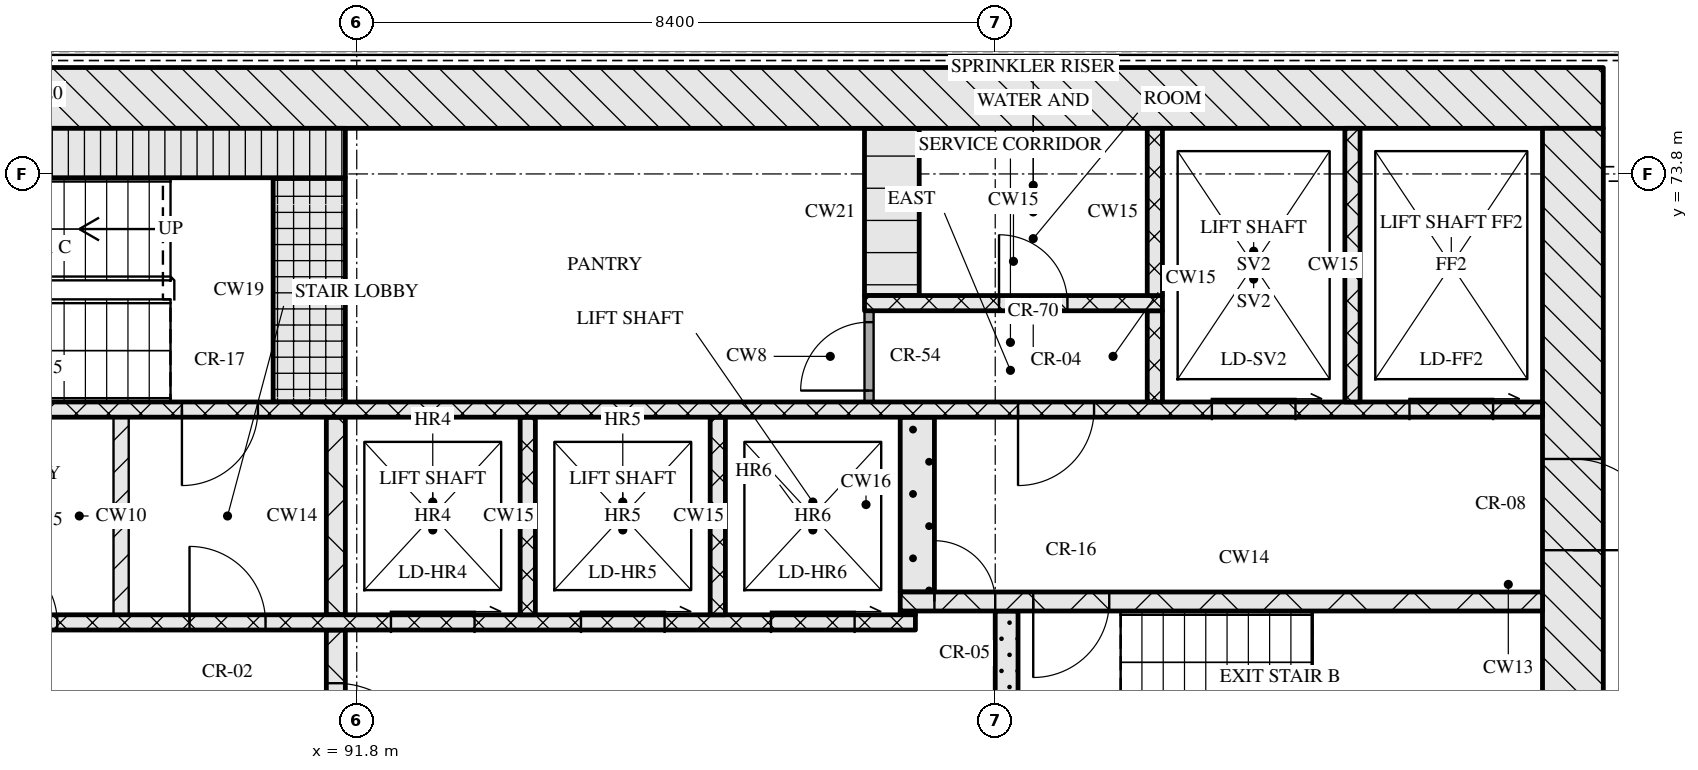
"""IFC4 building model, lengths in metres.
Left out: names, types, materials, properties, quantities, classifications, styles, units other than length and angle.
Written with IfcOpenShell. Run it as: python <this file> out.ifc"""

import sys

from ifc_helpers import new_model, si_unit, direction, frame, frame_2d, origin, place, context, subcontext, project, spatial, rectangle, extrude, element, fill, save


model = new_model("IFC4")
c1 = context("Model", 3, precision=1e-05, world=origin(), true_north=direction((0.0, 1.0)))
c2 = subcontext(c1, "Body", "Model", "MODEL_VIEW")
j1 = project(units=[si_unit("LENGTHUNIT", "METRE"), si_unit("PLANEANGLEUNIT", "RADIAN")], contexts=[c1])
p1 = place(None, origin())
s1 = spatial("IfcSite", under=j1, at=p1, CompositionType="ELEMENT")
p2 = place(p1, origin())
s2 = spatial("IfcBuilding", under=s1, at=p2, CompositionType="ELEMENT")
p3 = place(p2, frame((0.0, 0.0, 183.45)))
s3 = spatial("IfcBuildingStorey", under=s2, at=p3, CompositionType="ELEMENT", Elevation=183.45)
p4 = place(p3, frame((67.0, 74.8, 0.0), z_axis=(0.0, 0.0, 1.0), x_axis=(1.0, 0.0, 0.0)))
e1 = element("IfcWall", 1, at=p4, inside=s3, PredefinedType="SOLIDWALL", context=c2, shape_type="SweptSolid", body=[
    extrude(rectangle(XDim=41.2, YDim=0.8, at=frame_2d((20.6, 0.0))), origin(), (0.0, 0.0, 1.0), 3.32),
])
p5 = place(p3, frame((107.8, 62.4, 0.0), z_axis=(0.0, 0.0, 1.0), x_axis=(0.0, 1.0, 0.0)))
e2 = element("IfcWall", 2, at=p5, inside=s3, PredefinedType="SOLIDWALL", context=c2, shape_type="SweptSolid", body=[
    extrude(rectangle(XDim=12.0, YDim=0.8, at=frame_2d((6.0, 0.0))), origin(), (0.0, 0.0, 1.0), 3.32),
])
p6 = place(p5, frame((6.45, 0.0, 0.0)))
e3 = element("IfcOpeningElement", 3, at=p6, cuts=e2, PredefinedType="OPENING", context=c2, shape_type="SweptSolid", body=[
    extrude(rectangle(XDim=1.2, YDim=2.1, at=frame_2d((0.6, 1.05))), frame((0.0, 0.41, 0.0), z_axis=(0.0, -1.0, 0.0), x_axis=(1.0, 0.0, 0.0)), (0.0, 0.0, 1.0), 0.82),
])
p7 = place(p3, frame((91.525, 65.2, 0.0), z_axis=(0.0, 0.0, 1.0), x_axis=(0.0, 1.0, 0.0)))
e4 = element("IfcWall", 4, at=p7, inside=s3, PredefinedType="SOLIDWALL", context=c2, shape_type="SweptSolid", body=[
    extrude(rectangle(XDim=2.6, YDim=0.25, at=frame_2d((1.3, 0.0))), origin(), (0.0, 0.0, 1.0), 3.32),
])
p8 = place(p7, frame((0.7, 0.0, 0.0)))
e5 = element("IfcOpeningElement", 5, at=p8, cuts=e4, PredefinedType="OPENING", context=c2, shape_type="SweptSolid", body=[
    extrude(rectangle(XDim=1.2, YDim=2.1, at=frame_2d((0.6, 1.05))), frame((0.0, 0.135, 0.0), z_axis=(0.0, -1.0, 0.0), x_axis=(1.0, 0.0, 0.0)), (0.0, 0.0, 1.0), 0.27),
])
p9 = place(p3, frame((100.35, 65.2, 0.0), z_axis=(0.0, 0.0, 1.0), x_axis=(0.0, 1.0, 0.0)))
e6 = element("IfcWall", 6, at=p9, inside=s3, PredefinedType="SOLIDWALL", context=c2, shape_type="SweptSolid", body=[
    extrude(rectangle(XDim=2.85, YDim=0.3, at=frame_2d((1.425, 0.0))), origin(), (0.0, 0.0, 1.0), 3.32),
])
p10 = place(p3, frame((76.05, 67.9, 0.0), z_axis=(0.0, 0.0, 1.0), x_axis=(1.0, 0.0, 0.0)))
e7 = element("IfcWall", 7, at=p10, inside=s3, PredefinedType="SOLIDWALL", context=c2, shape_type="SweptSolid", body=[
    extrude(rectangle(XDim=23.1, YDim=0.2, at=frame_2d((11.55, 0.0))), origin(), (0.0, 0.0, 1.0), 3.32),
])
p11 = place(p10, frame((0.75, 0.0, 0.0)))
e8 = element("IfcOpeningElement", 8, at=p11, cuts=e7, PredefinedType="OPENING", context=c2, shape_type="SweptSolid", body=[
    extrude(rectangle(XDim=0.9, YDim=2.1, at=frame_2d((0.45, 1.05))), frame((0.0, 0.11, 0.0), z_axis=(0.0, -1.0, 0.0), x_axis=(1.0, 0.0, 0.0)), (0.0, 0.0, 1.0), 0.22),
])
p12 = place(p10, frame((3.32, 0.0, 0.0)))
e9 = element("IfcOpeningElement", 9, at=p12, cuts=e7, PredefinedType="OPENING", context=c2, shape_type="SweptSolid", body=[
    extrude(rectangle(XDim=0.9, YDim=2.1, at=frame_2d((0.45, 1.05))), frame((0.0, 0.11, 0.0), z_axis=(0.0, -1.0, 0.0), x_axis=(1.0, 0.0, 0.0)), (0.0, 0.0, 1.0), 0.22),
])
p13 = place(p10, frame((5.77, 0.0, 0.0)))
e10 = element("IfcOpeningElement", 10, at=p13, cuts=e7, PredefinedType="OPENING", context=c2, shape_type="SweptSolid", body=[
    extrude(rectangle(XDim=0.9, YDim=2.1, at=frame_2d((0.45, 1.05))), frame((0.0, 0.11, 0.0), z_axis=(0.0, -1.0, 0.0), x_axis=(1.0, 0.0, 0.0)), (0.0, 0.0, 1.0), 0.22),
])
p14 = place(p10, frame((8.45, 0.0, 0.0)))
e11 = element("IfcOpeningElement", 11, at=p14, cuts=e7, PredefinedType="OPENING", context=c2, shape_type="SweptSolid", body=[
    extrude(rectangle(XDim=0.9, YDim=2.1, at=frame_2d((0.45, 1.05))), frame((0.0, 0.11, 0.0), z_axis=(0.0, -1.0, 0.0), x_axis=(1.0, 0.0, 0.0)), (0.0, 0.0, 1.0), 0.22),
])
p15 = place(p10, frame((10.91, 0.0, 0.0)))
e12 = element("IfcOpeningElement", 12, at=p15, cuts=e7, PredefinedType="OPENING", context=c2, shape_type="SweptSolid", body=[
    extrude(rectangle(XDim=0.9, YDim=2.1, at=frame_2d((0.45, 1.05))), frame((0.0, 0.11, 0.0), z_axis=(0.0, -1.0, 0.0), x_axis=(1.0, 0.0, 0.0)), (0.0, 0.0, 1.0), 0.22),
])
p16 = place(p10, frame((13.55, 0.0, 0.0)))
e13 = element("IfcOpeningElement", 13, at=p16, cuts=e7, PredefinedType="OPENING", context=c2, shape_type="SweptSolid", body=[
    extrude(rectangle(XDim=1.0, YDim=2.1, at=frame_2d((0.5, 1.05))), frame((0.0, 0.11, 0.0), z_axis=(0.0, -1.0, 0.0), x_axis=(1.0, 0.0, 0.0)), (0.0, 0.0, 1.0), 0.22),
])
p17 = place(p10, frame((16.2, 0.0, 0.0)))
e14 = element("IfcOpeningElement", 14, at=p17, cuts=e7, PredefinedType="OPENING", context=c2, shape_type="SweptSolid", body=[
    extrude(rectangle(XDim=1.1, YDim=2.1, at=frame_2d((0.55, 1.05))), frame((0.0, 0.11, 0.0), z_axis=(0.0, -1.0, 0.0), x_axis=(1.0, 0.0, 0.0)), (0.0, 0.0, 1.0), 0.22),
])
p18 = place(p10, frame((18.7, 0.0, 0.0)))
e15 = element("IfcOpeningElement", 15, at=p18, cuts=e7, PredefinedType="OPENING", context=c2, shape_type="SweptSolid", body=[
    extrude(rectangle(XDim=1.1, YDim=2.1, at=frame_2d((0.55, 1.05))), frame((0.0, 0.11, 0.0), z_axis=(0.0, -1.0, 0.0), x_axis=(1.0, 0.0, 0.0)), (0.0, 0.0, 1.0), 0.22),
])
p19 = place(p10, frame((21.2, 0.0, 0.0)))
e16 = element("IfcOpeningElement", 16, at=p19, cuts=e7, PredefinedType="OPENING", context=c2, shape_type="SweptSolid", body=[
    extrude(rectangle(XDim=1.1, YDim=2.1, at=frame_2d((0.55, 1.05))), frame((0.0, 0.11, 0.0), z_axis=(0.0, -1.0, 0.0), x_axis=(1.0, 0.0, 0.0)), (0.0, 0.0, 1.0), 0.22),
])
p20 = place(p3, frame((88.7, 68.0, 0.0), z_axis=(0.0, 0.0, 1.0), x_axis=(0.0, 1.0, 0.0)))
e17 = element("IfcWall", 17, at=p20, inside=s3, PredefinedType="PARTITIONING", context=c2, shape_type="SweptSolid", body=[
    extrude(rectangle(XDim=2.6, YDim=0.2, at=frame_2d((1.3, 0.0))), origin(), (0.0, 0.0, 1.0), 3.32),
])
p21 = place(p3, frame((91.525, 68.0, 0.0), z_axis=(0.0, 0.0, 1.0), x_axis=(0.0, 1.0, 0.0)))
e18 = element("IfcWall", 18, at=p21, inside=s3, PredefinedType="SOLIDWALL", context=c2, shape_type="SweptSolid", body=[
    extrude(rectangle(XDim=2.6, YDim=0.25, at=frame_2d((1.3, 0.0))), origin(), (0.0, 0.0, 1.0), 3.32),
])
for number, where, z_axis, x_axis in (
    (19, (94.05, 68.0, 0.0), (0.0, 0.0, 1.0), (0.0, 1.0, 0.0)),
    (20, (96.55, 68.0, 0.0), (0.0, 0.0, 1.0), (0.0, 1.0, 0.0)),
):
    element("IfcWall", number, at=place(p3, frame(where, z_axis=z_axis, x_axis=x_axis)), inside=s3, PredefinedType="SOLIDWALL", context=c2, shape_type="SweptSolid", body=[
        extrude(rectangle(XDim=2.6, YDim=0.2, at=frame_2d((1.3, 0.0))), origin(), (0.0, 0.0, 1.0), 3.32),
    ])
p22 = place(p3, frame((98.95, 68.025, 0.0), z_axis=(0.0, 0.0, 1.0), x_axis=(1.0, 0.0, 0.0)))
e21 = element("IfcWall", 21, at=p22, inside=s3, PredefinedType="SOLIDWALL", context=c2, shape_type="SweptSolid", body=[
    extrude(rectangle(XDim=0.2, YDim=0.05, at=frame_2d((0.1, 0.0))), origin(), (0.0, 0.0, 1.0), 3.32),
])
p23 = place(p3, frame((98.95, 68.175, 0.0), z_axis=(0.0, 0.0, 1.0), x_axis=(1.0, 0.0, 0.0)))
e22 = element("IfcWall", 22, at=p23, inside=s3, PredefinedType="SOLIDWALL", context=c2, shape_type="SweptSolid", body=[
    extrude(rectangle(XDim=8.45, YDim=0.25, at=frame_2d((4.225, 0.0))), origin(), (0.0, 0.0, 1.0), 3.32),
])
p24 = place(p23, frame((0.45, 0.0, 0.0)))
e23 = element("IfcOpeningElement", 23, at=p24, cuts=e22, PredefinedType="OPENING", context=c2, shape_type="SweptSolid", body=[
    extrude(rectangle(XDim=0.8, YDim=2.1, at=frame_2d((0.4, 1.05))), frame((0.0, 0.135, 0.0), z_axis=(0.0, -1.0, 0.0), x_axis=(1.0, 0.0, 0.0)), (0.0, 0.0, 1.0), 0.27),
])
p25 = place(p23, frame((1.75, 0.0, 0.0)))
e24 = element("IfcOpeningElement", 24, at=p25, cuts=e22, PredefinedType="OPENING", context=c2, shape_type="SweptSolid", body=[
    extrude(rectangle(XDim=1.0, YDim=2.1, at=frame_2d((0.5, 1.05))), frame((0.0, 0.135, 0.0), z_axis=(0.0, -1.0, 0.0), x_axis=(1.0, 0.0, 0.0)), (0.0, 0.0, 1.0), 0.27),
])
p26 = place(p3, frame((99.175, 68.3, 0.0), z_axis=(0.0, 0.0, 1.0), x_axis=(0.0, 1.0, 0.0)))
e25 = element("IfcWall", 25, at=p26, inside=s3, PredefinedType="SOLIDWALL", context=c2, shape_type="SweptSolid", body=[
    extrude(rectangle(XDim=2.3, YDim=0.45, at=frame_2d((1.15, 0.0))), origin(), (0.0, 0.0, 1.0), 3.32),
])
p27 = place(p3, frame((67.8, 70.7, 0.0), z_axis=(0.0, 0.0, 1.0), x_axis=(1.0, 0.0, 0.0)))
e26 = element("IfcWall", 26, at=p27, inside=s3, PredefinedType="SOLIDWALL", context=c2, shape_type="SweptSolid", body=[
    extrude(rectangle(XDim=39.6, YDim=0.2, at=frame_2d((19.8, 0.0))), origin(), (0.0, 0.0, 1.0), 3.32),
])
p28 = place(p27, frame((0.65, 0.0, 0.0)))
e27 = element("IfcOpeningElement", 27, at=p28, cuts=e26, PredefinedType="OPENING", context=c2, shape_type="SweptSolid", body=[
    extrude(rectangle(XDim=1.1, YDim=2.1, at=frame_2d((0.55, 1.05))), frame((0.0, 0.11, 0.0), z_axis=(0.0, -1.0, 0.0), x_axis=(1.0, 0.0, 0.0)), (0.0, 0.0, 1.0), 0.22),
])
p29 = place(p27, frame((3.25, 0.0, 0.0)))
e28 = element("IfcOpeningElement", 28, at=p29, cuts=e26, PredefinedType="OPENING", context=c2, shape_type="SweptSolid", body=[
    extrude(rectangle(XDim=1.1, YDim=2.1, at=frame_2d((0.55, 1.05))), frame((0.0, 0.11, 0.0), z_axis=(0.0, -1.0, 0.0), x_axis=(1.0, 0.0, 0.0)), (0.0, 0.0, 1.0), 0.22),
])
p30 = place(p27, frame((5.9, 0.0, 0.0)))
e29 = element("IfcOpeningElement", 29, at=p30, cuts=e26, PredefinedType="OPENING", context=c2, shape_type="SweptSolid", body=[
    extrude(rectangle(XDim=1.0, YDim=2.1, at=frame_2d((0.5, 1.05))), frame((0.0, 0.11, 0.0), z_axis=(0.0, -1.0, 0.0), x_axis=(1.0, 0.0, 0.0)), (0.0, 0.0, 1.0), 0.22),
])
p31 = place(p27, frame((21.7, 0.0, 0.0)))
e30 = element("IfcOpeningElement", 30, at=p31, cuts=e26, PredefinedType="OPENING", context=c2, shape_type="SweptSolid", body=[
    extrude(rectangle(XDim=1.0, YDim=2.1, at=frame_2d((0.5, 1.05))), frame((0.0, 0.11, 0.0), z_axis=(0.0, -1.0, 0.0), x_axis=(1.0, 0.0, 0.0)), (0.0, 0.0, 1.0), 0.22),
])
p32 = place(p27, frame((32.7, 0.0, 0.0)))
e31 = element("IfcOpeningElement", 31, at=p32, cuts=e26, PredefinedType="OPENING", context=c2, shape_type="SweptSolid", body=[
    extrude(rectangle(XDim=1.0, YDim=2.1, at=frame_2d((0.5, 1.05))), frame((0.0, 0.11, 0.0), z_axis=(0.0, -1.0, 0.0), x_axis=(1.0, 0.0, 0.0)), (0.0, 0.0, 1.0), 0.22),
])
p33 = place(p27, frame((35.25, 0.0, 0.0)))
e32 = element("IfcOpeningElement", 32, at=p33, cuts=e26, PredefinedType="OPENING", context=c2, shape_type="SweptSolid", body=[
    extrude(rectangle(XDim=1.1, YDim=2.1, at=frame_2d((0.55, 1.05))), frame((0.0, 0.11, 0.0), z_axis=(0.0, -1.0, 0.0), x_axis=(1.0, 0.0, 0.0)), (0.0, 0.0, 1.0), 0.22),
])
p34 = place(p27, frame((37.85, 0.0, 0.0)))
e33 = element("IfcOpeningElement", 33, at=p34, cuts=e26, PredefinedType="OPENING", context=c2, shape_type="SweptSolid", body=[
    extrude(rectangle(XDim=1.1, YDim=2.1, at=frame_2d((0.55, 1.05))), frame((0.0, 0.11, 0.0), z_axis=(0.0, -1.0, 0.0), x_axis=(1.0, 0.0, 0.0)), (0.0, 0.0, 1.0), 0.22),
])
p35 = place(p3, frame((91.175, 70.8, 0.0), z_axis=(0.0, 0.0, 1.0), x_axis=(0.0, 1.0, 0.0)))
e34 = element("IfcWall", 34, at=p35, inside=s3, PredefinedType="SOLIDWALL", context=c2, shape_type="SweptSolid", body=[
    extrude(rectangle(XDim=2.95, YDim=0.95, at=frame_2d((1.475, 0.0))), origin(), (0.0, 0.0, 1.0), 3.32),
])
p36 = place(p3, frame((98.54, 70.8, 0.0), z_axis=(0.0, 0.0, 1.0), x_axis=(0.0, 1.0, 0.0)))
e35 = element("IfcWall", 35, at=p36, inside=s3, PredefinedType="PARTITIONING", context=c2, shape_type="SweptSolid", body=[
    extrude(rectangle(XDim=1.2, YDim=0.12, at=frame_2d((0.6, 0.0))), origin(), (0.0, 0.0, 1.0), 3.32),
])
p37 = place(p36, frame((0.15, 0.0, 0.0)))
e36 = element("IfcOpeningElement", 36, at=p37, cuts=e35, PredefinedType="OPENING", context=c2, shape_type="SweptSolid", body=[
    extrude(rectangle(XDim=0.9, YDim=2.1, at=frame_2d((0.45, 1.05))), frame((0.0, 0.07, 0.0), z_axis=(0.0, -1.0, 0.0), x_axis=(1.0, 0.0, 0.0)), (0.0, 0.0, 1.0), 0.14),
])
p38 = place(p3, frame((102.3, 70.8, 0.0), z_axis=(0.0, 0.0, 1.0), x_axis=(0.0, 1.0, 0.0)))
e37 = element("IfcWall", 37, at=p38, inside=s3, PredefinedType="SOLIDWALL", context=c2, shape_type="SweptSolid", body=[
    extrude(rectangle(XDim=1.2, YDim=0.2, at=frame_2d((0.6, 0.0))), origin(), (0.0, 0.0, 1.0), 3.32),
])
p39 = place(p3, frame((104.9, 70.8, 0.0), z_axis=(0.0, 0.0, 1.0), x_axis=(0.0, 1.0, 0.0)))
e38 = element("IfcWall", 38, at=p39, inside=s3, PredefinedType="SOLIDWALL", context=c2, shape_type="SweptSolid", body=[
    extrude(rectangle(XDim=3.6, YDim=0.2, at=frame_2d((1.8, 0.0))), origin(), (0.0, 0.0, 1.0), 3.32),
])
p40 = place(p3, frame((98.48, 72.1, 0.0), z_axis=(0.0, 0.0, 1.0), x_axis=(1.0, 0.0, 0.0)))
e39 = element("IfcWall", 39, at=p40, inside=s3, PredefinedType="SOLIDWALL", context=c2, shape_type="SweptSolid", body=[
    extrude(rectangle(XDim=3.92, YDim=0.2, at=frame_2d((1.96, 0.0))), origin(), (0.0, 0.0, 1.0), 3.32),
])
p41 = place(p40, frame((1.77, 0.0, 0.0)))
e40 = element("IfcOpeningElement", 40, at=p41, cuts=e39, PredefinedType="OPENING", context=c2, shape_type="SweptSolid", body=[
    extrude(rectangle(XDim=0.9, YDim=2.1, at=frame_2d((0.45, 1.05))), frame((0.0, 0.11, 0.0), z_axis=(0.0, -1.0, 0.0), x_axis=(1.0, 0.0, 0.0)), (0.0, 0.0, 1.0), 0.22),
])
p42 = place(p3, frame((98.84, 72.2, 0.0), z_axis=(0.0, 0.0, 1.0), x_axis=(0.0, 1.0, 0.0)))
e41 = element("IfcWall", 41, at=p42, inside=s3, PredefinedType="SOLIDWALL", context=c2, shape_type="SweptSolid", body=[
    extrude(rectangle(XDim=2.2, YDim=0.72, at=frame_2d((1.1, 0.0))), origin(), (0.0, 0.0, 1.0), 3.32),
])
p43 = place(p3, frame((102.3, 72.2, 0.0), z_axis=(0.0, 0.0, 1.0), x_axis=(0.0, 1.0, 0.0)))
e42 = element("IfcWall", 42, at=p43, inside=s3, PredefinedType="SOLIDWALL", context=c2, shape_type="SweptSolid", body=[
    extrude(rectangle(XDim=2.2, YDim=0.2, at=frame_2d((1.1, 0.0))), origin(), (0.0, 0.0, 1.0), 3.32),
])
p44 = place(p3, frame((83.55, 74.075, 0.0), z_axis=(0.0, 0.0, 1.0), x_axis=(1.0, 0.0, 0.0)))
e43 = element("IfcWall", 43, at=p44, inside=s3, PredefinedType="SOLIDWALL", context=c2, shape_type="SweptSolid", body=[
    extrude(rectangle(XDim=8.1, YDim=0.65, at=frame_2d((4.05, 0.0))), origin(), (0.0, 0.0, 1.0), 3.32),
])
p45 = place(p8, origin())
e44 = element("IfcDoor", 44, at=p45, inside=s3, OperationType="SINGLE_SWING_RIGHT", PredefinedType="DOOR", context=c2, shape_type="SweptSolid", body=[
    extrude(rectangle(XDim=1.2, YDim=2.1, at=frame_2d((0.6, 1.05))), frame((0.0, 0.025, 0.0), z_axis=(0.0, -1.0, 0.0), x_axis=(1.0, 0.0, 0.0)), (0.0, 0.0, 1.0), 0.05),
])
fill(e5, e44)
p46 = place(p15, origin())
e45 = element("IfcDoor", 45, at=p46, inside=s3, OperationType="SINGLE_SWING_LEFT", PredefinedType="DOOR", context=c2, shape_type="SweptSolid", body=[
    extrude(rectangle(XDim=0.9, YDim=2.1, at=frame_2d((0.45, 1.05))), frame((0.0, 0.025, 0.0), z_axis=(0.0, -1.0, 0.0), x_axis=(1.0, 0.0, 0.0)), (0.0, 0.0, 1.0), 0.05),
])
fill(e12, e45)
p47 = place(p16, origin())
e46 = element("IfcDoor", 46, at=p47, inside=s3, OperationType="SINGLE_SWING_LEFT", PredefinedType="DOOR", context=c2, shape_type="SweptSolid", body=[
    extrude(rectangle(XDim=1.0, YDim=2.1, at=frame_2d((0.5, 1.05))), frame((0.0, 0.025, 0.0), z_axis=(0.0, -1.0, 0.0), x_axis=(1.0, 0.0, 0.0)), (0.0, 0.0, 1.0), 0.05),
])
fill(e13, e46)
p48 = place(p17, origin())
e47 = element("IfcDoor", 47, at=p48, inside=s3, OperationType="SLIDING_TO_RIGHT", PredefinedType="DOOR", context=c2, shape_type="SweptSolid", body=[
    extrude(rectangle(XDim=1.1, YDim=2.1, at=frame_2d((0.55, 1.05))), frame((0.0, 0.025, 0.0), z_axis=(0.0, -1.0, 0.0), x_axis=(1.0, 0.0, 0.0)), (0.0, 0.0, 1.0), 0.05),
])
fill(e14, e47)
p49 = place(p18, origin())
e48 = element("IfcDoor", 48, at=p49, inside=s3, OperationType="SLIDING_TO_RIGHT", PredefinedType="DOOR", context=c2, shape_type="SweptSolid", body=[
    extrude(rectangle(XDim=1.1, YDim=2.1, at=frame_2d((0.55, 1.05))), frame((0.0, 0.025, 0.0), z_axis=(0.0, -1.0, 0.0), x_axis=(1.0, 0.0, 0.0)), (0.0, 0.0, 1.0), 0.05),
])
fill(e15, e48)
p50 = place(p19, origin())
e49 = element("IfcDoor", 49, at=p50, inside=s3, OperationType="SLIDING_TO_RIGHT", PredefinedType="DOOR", context=c2, shape_type="SweptSolid", body=[
    extrude(rectangle(XDim=1.1, YDim=2.1, at=frame_2d((0.55, 1.05))), frame((0.0, 0.025, 0.0), z_axis=(0.0, -1.0, 0.0), x_axis=(1.0, 0.0, 0.0)), (0.0, 0.0, 1.0), 0.05),
])
fill(e16, e49)
p51 = place(p24, origin())
e50 = element("IfcDoor", 50, at=p51, inside=s3, OperationType="SINGLE_SWING_LEFT", PredefinedType="DOOR", context=c2, shape_type="SweptSolid", body=[
    extrude(rectangle(XDim=0.8, YDim=2.1, at=frame_2d((0.4, 1.05))), frame((0.0, 0.025, 0.0), z_axis=(0.0, -1.0, 0.0), x_axis=(1.0, 0.0, 0.0)), (0.0, 0.0, 1.0), 0.05),
])
fill(e23, e50)
p52 = place(p25, origin())
e51 = element("IfcDoor", 51, at=p52, inside=s3, OperationType="SINGLE_SWING_RIGHT", PredefinedType="DOOR", context=c2, shape_type="SweptSolid", body=[
    extrude(rectangle(XDim=1.0, YDim=2.1, at=frame_2d((0.5, 1.05))), frame((0.0, 0.025, 0.0), z_axis=(0.0, -1.0, 0.0), x_axis=(1.0, 0.0, 0.0)), (0.0, 0.0, 1.0), 0.05),
])
fill(e24, e51)
p53 = place(p6, origin())
e52 = element("IfcDoor", 52, at=p53, inside=s3, OperationType="SINGLE_SWING_RIGHT", PredefinedType="DOOR", context=c2, shape_type="SweptSolid", body=[
    extrude(rectangle(XDim=1.2, YDim=2.1, at=frame_2d((0.6, 1.05))), frame((0.0, 0.025, 0.0), z_axis=(0.0, -1.0, 0.0), x_axis=(1.0, 0.0, 0.0)), (0.0, 0.0, 1.0), 0.05),
])
fill(e3, e52)
p54 = place(p31, origin())
e53 = element("IfcDoor", 53, at=p54, inside=s3, OperationType="SINGLE_SWING_RIGHT", PredefinedType="DOOR", context=c2, shape_type="SweptSolid", body=[
    extrude(rectangle(XDim=1.0, YDim=2.1, at=frame_2d((0.5, 1.05))), frame((0.0, 0.025, 0.0), z_axis=(0.0, -1.0, 0.0), x_axis=(1.0, 0.0, 0.0)), (0.0, 0.0, 1.0), 0.05),
])
fill(e30, e53)
p55 = place(p32, origin())
e54 = element("IfcDoor", 54, at=p55, inside=s3, OperationType="SINGLE_SWING_RIGHT", PredefinedType="DOOR", context=c2, shape_type="SweptSolid", body=[
    extrude(rectangle(XDim=1.0, YDim=2.1, at=frame_2d((0.5, 1.05))), frame((0.0, 0.025, 0.0), z_axis=(0.0, -1.0, 0.0), x_axis=(1.0, 0.0, 0.0)), (0.0, 0.0, 1.0), 0.05),
])
fill(e31, e54)
p56 = place(p33, origin())
e55 = element("IfcDoor", 55, at=p56, inside=s3, OperationType="SLIDING_TO_RIGHT", PredefinedType="DOOR", context=c2, shape_type="SweptSolid", body=[
    extrude(rectangle(XDim=1.1, YDim=2.1, at=frame_2d((0.55, 1.05))), frame((0.0, 0.025, 0.0), z_axis=(0.0, -1.0, 0.0), x_axis=(1.0, 0.0, 0.0)), (0.0, 0.0, 1.0), 0.05),
])
fill(e32, e55)
p57 = place(p34, origin())
e56 = element("IfcDoor", 56, at=p57, inside=s3, OperationType="SLIDING_TO_RIGHT", PredefinedType="DOOR", context=c2, shape_type="SweptSolid", body=[
    extrude(rectangle(XDim=1.1, YDim=2.1, at=frame_2d((0.55, 1.05))), frame((0.0, 0.025, 0.0), z_axis=(0.0, -1.0, 0.0), x_axis=(1.0, 0.0, 0.0)), (0.0, 0.0, 1.0), 0.05),
])
fill(e33, e56)
p58 = place(p37, origin())
e57 = element("IfcDoor", 57, at=p58, inside=s3, OperationType="SINGLE_SWING_LEFT", PredefinedType="DOOR", context=c2, shape_type="SweptSolid", body=[
    extrude(rectangle(XDim=0.9, YDim=2.1, at=frame_2d((0.45, 1.05))), frame((0.0, 0.025, 0.0), z_axis=(0.0, -1.0, 0.0), x_axis=(1.0, 0.0, 0.0)), (0.0, 0.0, 1.0), 0.05),
])
fill(e36, e57)
p59 = place(p41, origin())
e58 = element("IfcDoor", 58, at=p59, inside=s3, OperationType="SINGLE_SWING_LEFT", PredefinedType="DOOR", context=c2, shape_type="SweptSolid", body=[
    extrude(rectangle(XDim=0.9, YDim=2.1, at=frame_2d((0.45, 1.05))), frame((0.0, 0.025, 0.0), z_axis=(0.0, -1.0, 0.0), x_axis=(1.0, 0.0, 0.0)), (0.0, 0.0, 1.0), 0.05),
])
fill(e40, e58)
save(model, sys.argv[1])
